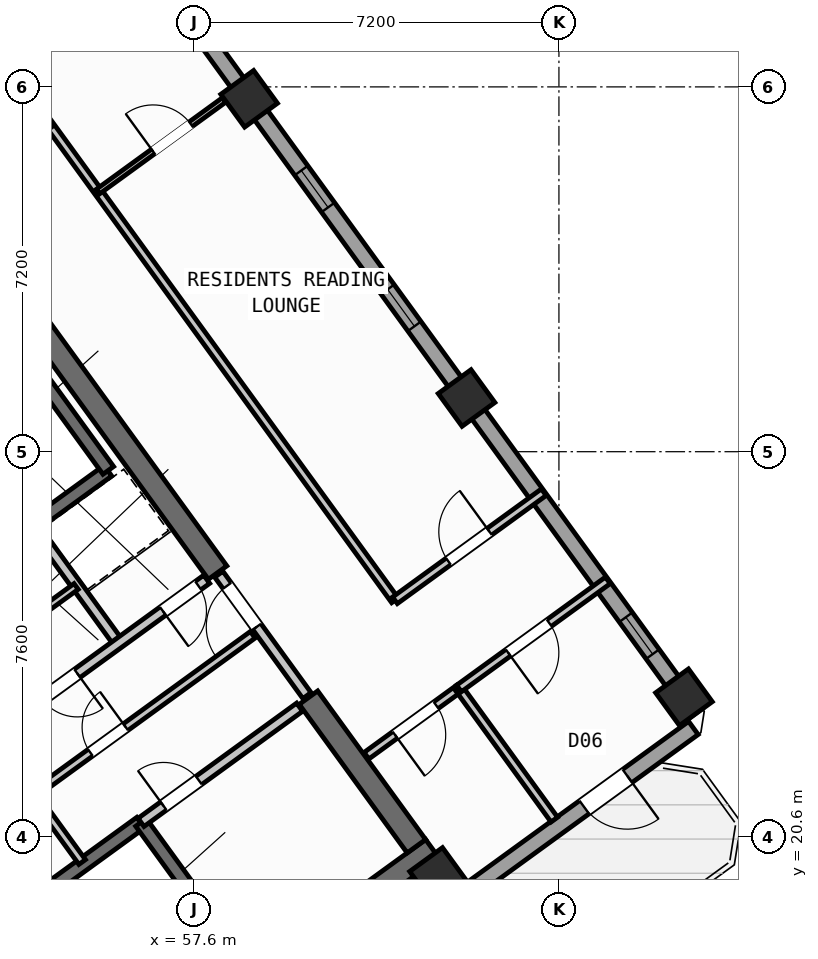
"""IFC4 building model, lengths in metres.
Left out: names, types, materials, properties, quantities, classifications, styles, units other than length and angle.
Written with IfcOpenShell. Run it as: python <this file> out.ifc"""

import sys

from ifc_helpers import new_model, si_unit, direction, frame, frame_2d, origin, origin_2d, place, context, subcontext, project, spatial, rectangle, hollow_rectangle, extrude, source, transform, mapped, element, fill, save


model = new_model("IFC4")
c1 = context("Model", 3, precision=1e-05, world=origin(), true_north=direction((0.0, 1.0)))
c2 = subcontext(c1, "Body", "Model", "MODEL_VIEW")
j1 = project(units=[si_unit("LENGTHUNIT", "METRE"), si_unit("PLANEANGLEUNIT", "RADIAN")], contexts=[c1])
p1 = place(None, origin())
s1 = spatial("IfcSite", under=j1, at=p1, CompositionType="ELEMENT")
p2 = place(p1, origin())
s2 = spatial("IfcBuilding", under=s1, at=p2, CompositionType="ELEMENT")
p3 = place(p2, frame((0.0, 0.0, 229.2)))
s3 = spatial("IfcBuildingStorey", under=s2, at=p3, CompositionType="ELEMENT", Elevation=229.2)
p4 = place(p3, frame((52.399, 13.169, 0.0), z_axis=(0.0, 0.0, 1.0), x_axis=(0.809022352778, 0.587777877013, 0.0)))
e1 = element("IfcWall", 1, at=p4, inside=s3, PredefinedType="SHEAR", context=c2, shape_type="SweptSolid", body=[
    extrude(rectangle(XDim=12.24, YDim=0.45, at=frame_2d((6.12, 0.0))), origin(), (0.0, 0.0, 1.0), 4.22),
])
p5 = place(p3, frame((61.988, 20.413, 0.0), z_axis=(0.0, 0.0, 1.0), x_axis=(-0.587819244441, 0.808992296542, 0.0)))
e2 = element("IfcWall", 2, at=p5, inside=s3, PredefinedType="SHEAR", context=c2, shape_type="SweptSolid", body=[
    extrude(rectangle(XDim=3.625, YDim=0.45, at=frame_2d((1.812, 0.0))), origin(), (0.0, 0.0, 1.0), 4.22),
])
p6 = place(p3, frame((58.064, 25.813, 0.0), z_axis=(0.0, 0.0, 1.0), x_axis=(-0.587774812919, 0.809024578921, 0.0)))
e3 = element("IfcWall", 3, at=p6, inside=s3, PredefinedType="SHEAR", context=c2, shape_type="SweptSolid", body=[
    extrude(rectangle(XDim=6.475, YDim=0.45, at=frame_2d((3.238, 0.0))), origin(), (0.0, 0.0, 1.0), 4.22),
])
m1 = source(origin(), c2, "Body", "SweptSolid", [
    extrude(hollow_rectangle(XDim=0.8, YDim=0.8, WallThickness=0.032, at=origin_2d()), origin(), (0.0, 0.0, 1.0), 4.5),
])
for number, where, z_axis, x_axis in (
    (4, (62.414, 19.827, 0.0), (0.0, 0.0, 1.0), (0.809, 0.588, 0.0)),
    (5, (67.268, 23.354, 0.0), (0.0, 0.0, 1.0), (0.809, 0.588, 0.0)),
    (6, (62.977, 29.259, 0.0), (0.0, 0.0, 1.0), (0.809, 0.588, 0.0)),
    (7, (58.686, 35.165, 0.0), (0.0, 0.0, 1.0), (0.809, 0.588, 0.0)),
):
    element("IfcColumn", number, at=place(p3, frame(where, z_axis=z_axis, x_axis=x_axis)), inside=s3, PredefinedType="COLUMN", context=c2, shape_type="MappedRepresentation", body=[
        mapped(m1, transform((0.0, 0.0, 0.0), scale=1.0)),
    ])
p7 = place(p3, frame((54.81, 40.5, 0.0), z_axis=(0.0, 0.0, 1.0), x_axis=(0.587783625747, -0.809018176127, 0.0)))
e8 = element("IfcWall", 8, at=p7, inside=s3, PredefinedType="STANDARD", context=c2, shape_type="SweptSolid", body=[
    extrude(rectangle(XDim=21.587, YDim=0.32, at=frame_2d((10.794, 0.0))), origin(), (0.0, 0.0, 1.0), 2.395),
])
p8 = place(p7, frame((1.768, 0.0, 1.0)))
e9 = element("IfcOpeningElement", 9, at=p8, cuts=e8, PredefinedType="OPENING", context=c2, shape_type="SweptSolid", body=[
    extrude(rectangle(XDim=0.9, YDim=1.25, at=frame_2d((0.45, 0.625))), frame((0.0, 0.17, 0.0), z_axis=(0.0, -1.0, 0.0), x_axis=(1.0, 0.0, 0.0)), (0.0, 0.0, 1.0), 0.34),
])
p9 = place(p7, frame((4.167, 0.0, 1.0)))
e10 = element("IfcOpeningElement", 10, at=p9, cuts=e8, PredefinedType="OPENING", context=c2, shape_type="SweptSolid", body=[
    extrude(rectangle(XDim=0.9, YDim=1.25, at=frame_2d((0.45, 0.625))), frame((0.0, 0.17, 0.0), z_axis=(0.0, -1.0, 0.0), x_axis=(1.0, 0.0, 0.0)), (0.0, 0.0, 1.0), 0.34),
])
p10 = place(p7, frame((8.344, 0.0, 1.0)))
e11 = element("IfcOpeningElement", 11, at=p10, cuts=e8, PredefinedType="OPENING", context=c2, shape_type="SweptSolid", body=[
    extrude(rectangle(XDim=0.9, YDim=1.25, at=frame_2d((0.45, 0.625))), frame((0.0, 0.17, 0.0), z_axis=(0.0, -1.0, 0.0), x_axis=(1.0, 0.0, 0.0)), (0.0, 0.0, 1.0), 0.34),
])
p11 = place(p7, frame((11.244, 0.0, 1.0)))
e12 = element("IfcOpeningElement", 12, at=p11, cuts=e8, PredefinedType="OPENING", context=c2, shape_type="SweptSolid", body=[
    extrude(rectangle(XDim=0.9, YDim=1.25, at=frame_2d((0.45, 0.625))), frame((0.0, 0.17, 0.0), z_axis=(0.0, -1.0, 0.0), x_axis=(1.0, 0.0, 0.0)), (0.0, 0.0, 1.0), 0.34),
])
p12 = place(p7, frame((19.242, 0.0, 1.0)))
e13 = element("IfcOpeningElement", 13, at=p12, cuts=e8, PredefinedType="OPENING", context=c2, shape_type="SweptSolid", body=[
    extrude(rectangle(XDim=0.9, YDim=1.25, at=frame_2d((0.45, 0.625))), frame((0.0, 0.17, 0.0), z_axis=(0.0, -1.0, 0.0), x_axis=(1.0, 0.0, 0.0)), (0.0, 0.0, 1.0), 0.34),
])
p13 = place(p3, frame((67.454, 22.747, 0.0), z_axis=(0.0, 0.0, 1.0), x_axis=(-0.809021120468, -0.587779573171, 0.0)))
e14 = element("IfcWall", 14, at=p13, inside=s3, PredefinedType="STANDARD", context=c2, shape_type="SweptSolid", body=[
    extrude(rectangle(XDim=17.588, YDim=0.32, at=frame_2d((8.794, 0.0))), origin(), (0.0, 0.0, 1.0), 4.22),
])
p14 = place(p13, frame((1.611, 0.0, 0.0)))
e15 = element("IfcOpeningElement", 15, at=p14, cuts=e14, PredefinedType="OPENING", context=c2, shape_type="SweptSolid", body=[
    extrude(rectangle(XDim=1.05, YDim=2.15, at=frame_2d((0.525, 1.075))), frame((0.0, 0.17, 0.0), z_axis=(0.0, -1.0, 0.0), x_axis=(1.0, 0.0, 0.0)), (0.0, 0.0, 1.0), 0.34),
])
p15 = place(p13, frame((8.831, 0.0, 0.9)))
e16 = element("IfcOpeningElement", 16, at=p15, cuts=e14, PredefinedType="OPENING", context=c2, shape_type="SweptSolid", body=[
    extrude(rectangle(XDim=1.65, YDim=1.45, at=frame_2d((0.825, 0.725))), frame((0.0, 0.17, 0.0), z_axis=(0.0, -1.0, 0.0), x_axis=(1.0, 0.0, 0.0)), (0.0, 0.0, 1.0), 0.34),
])
p16 = place(p13, frame((13.106, 0.0, 0.9)))
e17 = element("IfcOpeningElement", 17, at=p16, cuts=e14, PredefinedType="OPENING", context=c2, shape_type="SweptSolid", body=[
    extrude(rectangle(XDim=1.65, YDim=1.45, at=frame_2d((0.825, 0.725))), frame((0.0, 0.17, 0.0), z_axis=(0.0, -1.0, 0.0), x_axis=(1.0, 0.0, 0.0)), (0.0, 0.0, 1.0), 0.34),
])
p17 = place(p3, frame((49.863, 23.44, 0.0), z_axis=(0.0, 0.0, 1.0), x_axis=(0.809003474932, 0.587803859759, 0.0)))
e18 = element("IfcWall", 18, at=p17, inside=s3, PredefinedType="SHEAR", context=c2, shape_type="SweptSolid", body=[
    extrude(rectangle(XDim=7.46, YDim=0.26, at=frame_2d((3.73, 0.0))), origin(), (0.0, 0.0, 1.0), 4.22),
])
p18 = place(p17, frame((0.36, 0.0, 0.0)))
e19 = element("IfcOpeningElement", 19, at=p18, cuts=e18, PredefinedType="OPENING", context=c2, shape_type="SweptSolid", body=[
    extrude(rectangle(XDim=0.86, YDim=2.05, at=frame_2d((0.43, 1.025))), frame((0.0, 0.14, 0.0), z_axis=(0.0, -1.0, 0.0), x_axis=(1.0, 0.0, 0.0)), (0.0, 0.0, 1.0), 0.28),
])
p19 = place(p3, frame((55.906, 27.831, 0.0), z_axis=(0.0, 0.0, 1.0), x_axis=(-0.587804123638, 0.809003283204, 0.0)))
e20 = element("IfcWall", 20, at=p19, inside=s3, PredefinedType="SHEAR", context=c2, shape_type="SweptSolid", body=[
    extrude(rectangle(XDim=3.16, YDim=0.26, at=frame_2d((1.58, 0.0))), origin(), (0.0, 0.0, 1.0), 4.22),
])
p20 = place(p3, frame((50.615, 16.57, 0.0), z_axis=(0.0, 0.0, 1.0), x_axis=(0.809028366311, 0.587769599847, 0.0)))
e21 = element("IfcWall", 21, at=p20, inside=s3, PredefinedType="SHEAR", context=c2, shape_type="SweptSolid", body=[
    extrude(rectangle(XDim=7.33, YDim=0.26, at=frame_2d((3.665, 0.0))), origin(), (0.0, 0.0, 1.0), 4.22),
])
p21 = place(p20, frame((0.22, 0.0, 0.0)))
e22 = element("IfcOpeningElement", 22, at=p21, cuts=e21, PredefinedType="OPENING", context=c2, shape_type="SweptSolid", body=[
    extrude(rectangle(XDim=1.1, YDim=2.1, at=frame_2d((0.55, 1.05))), frame((0.0, 0.14, 0.0), z_axis=(0.0, -1.0, 0.0), x_axis=(1.0, 0.0, 0.0)), (0.0, 0.0, 1.0), 0.28),
])
p22 = place(p3, frame((58.41, 18.327, 0.0), z_axis=(0.0, 0.0, 1.0), x_axis=(-0.58776738483, 0.809029975545, 0.0)))
e23 = element("IfcWall", 23, at=p22, inside=s3, PredefinedType="SHEAR", context=c2, shape_type="SweptSolid", body=[
    extrude(rectangle(XDim=3.16, YDim=0.26, at=frame_2d((1.58, 0.0))), origin(), (0.0, 0.0, 1.0), 4.22),
])
p23 = place(p3, frame((56.553, 20.884, 0.0), z_axis=(0.0, 0.0, 1.0), x_axis=(0.809041669066, 0.587751288995, 0.0)))
e24 = element("IfcWall", 24, at=p23, inside=s3, PredefinedType="STANDARD", context=c2, shape_type="SweptSolid", body=[
    extrude(rectangle(XDim=3.868, YDim=0.2, at=frame_2d((1.934, 0.0))), origin(), (0.0, 0.0, 1.0), 4.21),
])
p24 = place(p23, frame((0.55, 0.0, 0.0)))
e25 = element("IfcOpeningElement", 25, at=p24, cuts=e24, PredefinedType="OPENING", context=c2, shape_type="SweptSolid", body=[
    extrude(rectangle(XDim=0.86, YDim=2.05, at=frame_2d((0.43, 1.025))), frame((0.0, 0.11, 0.0), z_axis=(0.0, -1.0, 0.0), x_axis=(1.0, 0.0, 0.0)), (0.0, 0.0, 1.0), 0.22),
])
p25 = place(p3, frame((54.421, 21.436, 0.0), z_axis=(0.0, 0.0, 1.0), x_axis=(0.809013710463, 0.587789772183, 0.0)))
e26 = element("IfcWall", 26, at=p25, inside=s3, PredefinedType="PARTITIONING", context=c2, shape_type="SweptSolid", body=[
    extrude(rectangle(XDim=5.36, YDim=0.16, at=frame_2d((2.68, 0.0))), origin(), (0.0, 0.0, 1.0), 4.21),
])
p26 = place(p25, frame((1.4, 0.0, 0.0)))
e27 = element("IfcOpeningElement", 27, at=p26, cuts=e26, PredefinedType="OPENING", context=c2, shape_type="SweptSolid", body=[
    extrude(rectangle(XDim=0.86, YDim=2.05, at=frame_2d((0.43, 1.025))), frame((0.0, 0.09, 0.0), z_axis=(0.0, -1.0, 0.0), x_axis=(1.0, 0.0, 0.0)), (0.0, 0.0, 1.0), 0.18),
])
p27 = place(p3, frame((55.391, 20.102, 0.0), z_axis=(0.0, 0.0, 1.0), x_axis=(-0.58778447739, 0.809017557374, 0.0)))
e28 = element("IfcWall", 28, at=p27, inside=s3, PredefinedType="PARTITIONING", context=c2, shape_type="SweptSolid", body=[
    extrude(rectangle(XDim=1.65, YDim=0.16, at=frame_2d((0.825, 0.0))), origin(), (0.0, 0.0, 1.0), 4.21),
])
p28 = place(p3, frame((56.111, 24.419, 0.0), z_axis=(0.0, 0.0, 1.0), x_axis=(-0.58777848983, 0.809021907548, 0.0)))
e29 = element("IfcWall", 29, at=p28, inside=s3, PredefinedType="STANDARD", context=c2, shape_type="SweptSolid", body=[
    extrude(rectangle(XDim=2.88, YDim=0.2, at=frame_2d((1.44, 0.0))), origin(), (0.0, 0.0, 1.0), 4.21),
])
p29 = place(p3, frame((53.425, 22.468, 0.0), z_axis=(0.0, 0.0, 1.0), x_axis=(0.809015945709, 0.587786695655, 0.0)))
e30 = element("IfcWall", 30, at=p29, inside=s3, PredefinedType="STANDARD", context=c2, shape_type="SweptSolid", body=[
    extrude(rectangle(XDim=5.468, YDim=0.2, at=frame_2d((2.734, 0.0))), origin(), (0.0, 0.0, 1.0), 4.21),
])
p30 = place(p29, frame((4.4, 0.0, 0.0)))
e31 = element("IfcOpeningElement", 31, at=p30, cuts=e30, PredefinedType="OPENING", context=c2, shape_type="SweptSolid", body=[
    extrude(rectangle(XDim=0.86, YDim=2.05, at=frame_2d((0.43, 1.025))), frame((0.0, 0.11, 0.0), z_axis=(0.0, -1.0, 0.0), x_axis=(1.0, 0.0, 0.0)), (0.0, 0.0, 1.0), 0.22),
])
p31 = place(p29, frame((1.45, 0.0, 0.0)))
e32 = element("IfcOpeningElement", 32, at=p31, cuts=e30, PredefinedType="OPENING", context=c2, shape_type="SweptSolid", body=[
    extrude(rectangle(XDim=0.86, YDim=2.05, at=frame_2d((0.43, 1.025))), frame((0.0, 0.11, 0.0), z_axis=(0.0, -1.0, 0.0), x_axis=(1.0, 0.0, 0.0)), (0.0, 0.0, 1.0), 0.22),
])
p32 = place(p3, frame((52.618, 23.612, 0.0), z_axis=(0.0, 0.0, 1.0), x_axis=(0.809009587469, 0.587795446889, 0.0)))
e33 = element("IfcWall", 33, at=p32, inside=s3, PredefinedType="PLUMBINGWALL", context=c2, shape_type="SweptSolid", body=[
    extrude(rectangle(XDim=3.28, YDim=0.14, at=frame_2d((1.64, 0.0))), origin(), (0.0, 0.0, 1.0), 4.21),
])
p33 = place(p32, frame((1.2, 0.0, 0.0)))
e34 = element("IfcOpeningElement", 34, at=p33, cuts=e33, PredefinedType="OPENING", context=c2, shape_type="SweptSolid", body=[
    extrude(rectangle(XDim=0.78, YDim=2.05, at=frame_2d((0.39, 1.025))), frame((0.0, 0.08, 0.0), z_axis=(0.0, -1.0, 0.0), x_axis=(1.0, 0.0, 0.0)), (0.0, 0.0, 1.0), 0.16),
])
p34 = place(p3, frame((59.827, 23.386, 0.0), z_axis=(0.0, 0.0, 1.0), x_axis=(-0.587803840107, 0.809003489211, 0.0)))
e35 = element("IfcWall", 35, at=p34, inside=s3, PredefinedType="STANDARD", context=c2, shape_type="SweptSolid", body=[
    extrude(rectangle(XDim=2.96, YDim=0.2, at=frame_2d((1.48, 0.0))), origin(), (0.0, 0.0, 1.0), 2.395),
])
p35 = place(p34, frame((1.68, 0.0, 0.0)))
e36 = element("IfcOpeningElement", 36, at=p35, cuts=e35, PredefinedType="OPENING", context=c2, shape_type="SweptSolid", body=[
    extrude(rectangle(XDim=1.0, YDim=2.1, at=frame_2d((0.5, 1.05))), frame((0.0, 0.11, 0.0), z_axis=(0.0, -1.0, 0.0), x_axis=(1.0, 0.0, 0.0)), (0.0, 0.0, 1.0), 0.22),
])
p36 = place(p3, frame((61.001, 22.2, 0.0), z_axis=(0.0, 0.0, 1.0), x_axis=(0.809053894229, 0.587734460648, 0.0)))
e37 = element("IfcWall", 37, at=p36, inside=s3, PredefinedType="PARTITIONING", context=c2, shape_type="SweptSolid", body=[
    extrude(rectangle(XDim=2.258, YDim=0.16, at=frame_2d((1.129, 0.0))), origin(), (0.0, 0.0, 1.0), 4.21),
])
p37 = place(p36, frame((0.698, 0.0, 0.0)))
e38 = element("IfcOpeningElement", 38, at=p37, cuts=e37, PredefinedType="OPENING", context=c2, shape_type="SweptSolid", body=[
    extrude(rectangle(XDim=1.0, YDim=2.1, at=frame_2d((0.5, 1.05))), frame((0.0, 0.09, 0.0), z_axis=(0.0, -1.0, 0.0), x_axis=(1.0, 0.0, 0.0)), (0.0, 0.0, 1.0), 0.18),
])
p38 = place(p3, frame((52.739, 33.143, 0.0), z_axis=(0.0, 0.0, 1.0), x_axis=(0.809000999347, 0.58780726693, 0.0)))
e39 = element("IfcWall", 39, at=p38, inside=s3, PredefinedType="PARTITIONING", context=c2, shape_type="SweptSolid", body=[
    extrude(rectangle(XDim=2.51, YDim=0.16, at=frame_2d((1.255, 0.0))), origin(), (0.0, 0.0, 1.0), 4.21),
])
p39 = place(p3, frame((64.709, 20.938, 0.0), z_axis=(0.0, 0.0, 1.0), x_axis=(-0.587772420479, 0.809026317077, 0.0)))
e40 = element("IfcWall", 40, at=p39, inside=s3, PredefinedType="PARTITIONING", context=c2, shape_type="SweptSolid", body=[
    extrude(rectangle(XDim=3.2, YDim=0.16, at=frame_2d((1.6, 0.0))), origin(), (0.0, 0.0, 1.0), 4.21),
])
p40 = place(p3, frame((61.564, 25.266, 0.0), z_axis=(0.0, 0.0, 1.0), x_axis=(-0.587784527444, 0.809017521007, 0.0)))
e41 = element("IfcWall", 41, at=p40, inside=s3, PredefinedType="PARTITIONING", context=c2, shape_type="SweptSolid", body=[
    extrude(rectangle(XDim=16.35, YDim=0.16, at=frame_2d((8.175, 0.0))), origin(), (0.0, 0.0, 1.0), 4.21),
])
p41 = place(p3, frame((62.828, 23.527, 0.0), z_axis=(0.0, 0.0, 1.0), x_axis=(0.809003564202, 0.587803736896, 0.0)))
e42 = element("IfcWall", 42, at=p41, inside=s3, PredefinedType="PARTITIONING", context=c2, shape_type="SweptSolid", body=[
    extrude(rectangle(XDim=3.63, YDim=0.16, at=frame_2d((1.815, 0.0))), origin(), (0.0, 0.0, 1.0), 4.21),
])
p42 = place(p41, frame((1.2, 0.0, 0.0)))
e43 = element("IfcOpeningElement", 43, at=p42, cuts=e42, PredefinedType="OPENING", context=c2, shape_type="SweptSolid", body=[
    extrude(rectangle(XDim=1.0, YDim=2.1, at=frame_2d((0.5, 1.05))), frame((0.0, 0.09, 0.0), z_axis=(0.0, -1.0, 0.0), x_axis=(1.0, 0.0, 0.0)), (0.0, 0.0, 1.0), 0.18),
])
p43 = place(p3, frame((61.564, 25.266, 0.0), z_axis=(0.0, 0.0, 1.0), x_axis=(0.809012309495, 0.587791700422, 0.0)))
e44 = element("IfcWall", 44, at=p43, inside=s3, PredefinedType="PARTITIONING", context=c2, shape_type="SweptSolid", body=[
    extrude(rectangle(XDim=3.63, YDim=0.16, at=frame_2d((1.815, 0.0))), origin(), (0.0, 0.0, 1.0), 4.21),
])
p44 = place(p43, frame((1.305, 0.0, 0.0)))
e45 = element("IfcOpeningElement", 45, at=p44, cuts=e44, PredefinedType="OPENING", context=c2, shape_type="SweptSolid", body=[
    extrude(rectangle(XDim=1.0, YDim=2.1, at=frame_2d((0.5, 1.05))), frame((0.0, 0.09, 0.0), z_axis=(0.0, -1.0, 0.0), x_axis=(1.0, 0.0, 0.0)), (0.0, 0.0, 1.0), 0.18),
])
p45 = place(p3, frame((55.703, 33.334, 0.0), z_axis=(0.0, 0.0, 1.0), x_axis=(0.809044670406, 0.587747157618, 0.0)))
e46 = element("IfcWall", 46, at=p45, inside=s3, PredefinedType="PARTITIONING", context=c2, shape_type="SweptSolid", body=[
    extrude(rectangle(XDim=3.078, YDim=0.11, at=frame_2d((1.539, 0.0))), origin(), (0.0, 0.0, 1.0), 2.395),
])
p46 = place(p45, frame((1.345, 0.0, 0.0)))
e47 = element("IfcOpeningElement", 47, at=p46, cuts=e46, PredefinedType="OPENING", context=c2, shape_type="SweptSolid", body=[
    extrude(rectangle(XDim=0.92, YDim=2.08, at=frame_2d((0.46, 1.04))), frame((0.0, 0.065, 0.0), z_axis=(0.0, -1.0, 0.0), x_axis=(1.0, 0.0, 0.0)), (0.0, 0.0, 1.0), 0.13),
])
m2 = source(origin(), c2, "Body", "SweptSolid", [
    extrude(rectangle(XDim=1.05, YDim=2.15, at=frame_2d((0.525, 1.075))), frame((0.0, 0.025, 0.0), z_axis=(0.0, -1.0, 0.0), x_axis=(1.0, 0.0, 0.0)), (0.0, 0.0, 1.0), 0.05),
])
p47 = place(p14, origin())
e48 = element("IfcDoor", 48, at=p47, inside=s3, OperationType="SINGLE_SWING_LEFT", PredefinedType="DOOR", context=c2, shape_type="MappedRepresentation", body=[
    mapped(m2, transform((0.0, 0.0, 0.0), scale=1.0)),
])
fill(e15, e48)
m3 = source(origin(), c2, "Body", "SweptSolid", [
    extrude(rectangle(XDim=0.9, YDim=1.25, at=frame_2d((0.45, 0.625))), frame((0.0, 0.03, 0.0), z_axis=(0.0, -1.0, 0.0), x_axis=(1.0, 0.0, 0.0)), (0.0, 0.0, 1.0), 0.06),
])
p48 = place(p10, origin())
e49 = element("IfcWindow", 49, at=p48, inside=s3, PartitioningType="SINGLE_PANEL", PredefinedType="WINDOW", context=c2, shape_type="MappedRepresentation", body=[
    mapped(m3, transform((0.0, 0.0, 0.0), scale=1.0)),
])
fill(e11, e49)
p49 = place(p11, origin())
e50 = element("IfcWindow", 50, at=p49, inside=s3, PartitioningType="SINGLE_PANEL", PredefinedType="WINDOW", context=c2, shape_type="MappedRepresentation", body=[
    mapped(m3, transform((0.0, 0.0, 0.0), scale=1.0)),
])
fill(e12, e50)
p50 = place(p12, origin())
e51 = element("IfcWindow", 51, at=p50, inside=s3, PartitioningType="SINGLE_PANEL", PredefinedType="WINDOW", context=c2, shape_type="MappedRepresentation", body=[
    mapped(m3, transform((0.0, 0.0, 0.0), scale=1.0)),
])
fill(e13, e51)
m4 = source(origin(), c2, "Body", "SweptSolid", [
    extrude(rectangle(XDim=0.86, YDim=2.05, at=frame_2d((0.43, 1.025))), frame((0.0, 0.025, 0.0), z_axis=(0.0, -1.0, 0.0), x_axis=(1.0, 0.0, 0.0)), (0.0, 0.0, 1.0), 0.05),
])
p51 = place(p26, origin())
e52 = element("IfcDoor", 52, at=p51, inside=s3, OperationType="SINGLE_SWING_RIGHT", PredefinedType="DOOR", context=c2, shape_type="MappedRepresentation", body=[
    mapped(m4, transform((0.0, 0.0, 0.0), scale=1.0)),
])
fill(e27, e52)
p52 = place(p24, origin())
e53 = element("IfcDoor", 53, at=p52, inside=s3, OperationType="SINGLE_SWING_LEFT", PredefinedType="DOOR", context=c2, shape_type="MappedRepresentation", body=[
    mapped(m4, transform((0.0, 0.0, 0.0), scale=1.0)),
])
fill(e25, e53)
p53 = place(p30, frame((0.86, 0.0, 0.0), z_axis=(0.0, 0.0, 1.0), x_axis=(-1.0, 0.0, 0.0)))
e54 = element("IfcDoor", 54, at=p53, inside=s3, OperationType="SINGLE_SWING_RIGHT", PredefinedType="DOOR", context=c2, shape_type="MappedRepresentation", body=[
    mapped(m4, transform((0.0, 0.0, 0.0), scale=1.0)),
])
fill(e31, e54)
p54 = place(p31, frame((0.86, 0.0, 0.0), z_axis=(0.0, 0.0, 1.0), x_axis=(-1.0, 0.0, 0.0)))
e55 = element("IfcDoor", 55, at=p54, inside=s3, OperationType="SINGLE_SWING_LEFT", PredefinedType="DOOR", context=c2, shape_type="MappedRepresentation", body=[
    mapped(m4, transform((0.0, 0.0, 0.0), scale=1.0)),
])
fill(e32, e55)
m5 = source(origin(), c2, "Body", "SweptSolid", [
    extrude(rectangle(XDim=1.0, YDim=2.1, at=frame_2d((0.5, 1.05))), frame((0.0, 0.025, 0.0), z_axis=(0.0, -1.0, 0.0), x_axis=(1.0, 0.0, 0.0)), (0.0, 0.0, 1.0), 0.05),
])
p55 = place(p37, frame((1.0, 0.0, 0.0), z_axis=(0.0, 0.0, 1.0), x_axis=(-1.0, 0.0, 0.0)))
e56 = element("IfcDoor", 56, at=p55, inside=s3, OperationType="SINGLE_SWING_RIGHT", PredefinedType="DOOR", context=c2, shape_type="MappedRepresentation", body=[
    mapped(m5, transform((0.0, 0.0, 0.0), scale=1.0)),
])
fill(e38, e56)
p56 = place(p35, origin())
e57 = element("IfcDoor", 57, at=p56, inside=s3, OperationType="SINGLE_SWING_LEFT", PredefinedType="DOOR", context=c2, shape_type="MappedRepresentation", body=[
    mapped(m5, transform((0.0, 0.0, 0.0), scale=1.0)),
])
fill(e36, e57)
p57 = place(p44, origin())
e58 = element("IfcDoor", 58, at=p57, inside=s3, OperationType="SINGLE_SWING_RIGHT", PredefinedType="DOOR", context=c2, shape_type="MappedRepresentation", body=[
    mapped(m5, transform((0.0, 0.0, 0.0), scale=1.0)),
])
fill(e45, e58)
m6 = source(origin(), c2, "Body", "SweptSolid", [
    extrude(rectangle(XDim=0.92, YDim=2.08, at=frame_2d((0.46, 1.04))), frame((0.0, 0.025, 0.0), z_axis=(0.0, -1.0, 0.0), x_axis=(1.0, 0.0, 0.0)), (0.0, 0.0, 1.0), 0.05),
])
p58 = place(p46, origin())
e59 = element("IfcDoor", 59, at=p58, inside=s3, OperationType="SINGLE_SWING_LEFT", PredefinedType="DOOR", context=c2, shape_type="MappedRepresentation", body=[
    mapped(m6, transform((0.0, 0.0, 0.0), scale=1.0)),
])
fill(e47, e59)
p59 = place(p42, frame((1.0, 0.0, 0.0), z_axis=(0.0, 0.0, 1.0), x_axis=(-1.0, 0.0, 0.0)))
e60 = element("IfcDoor", 60, at=p59, inside=s3, OperationType="SINGLE_SWING_RIGHT", PredefinedType="DOOR", context=c2, shape_type="MappedRepresentation", body=[
    mapped(m5, transform((0.0, 0.0, 0.0), scale=1.0)),
])
fill(e43, e60)
save(model, sys.argv[1])
